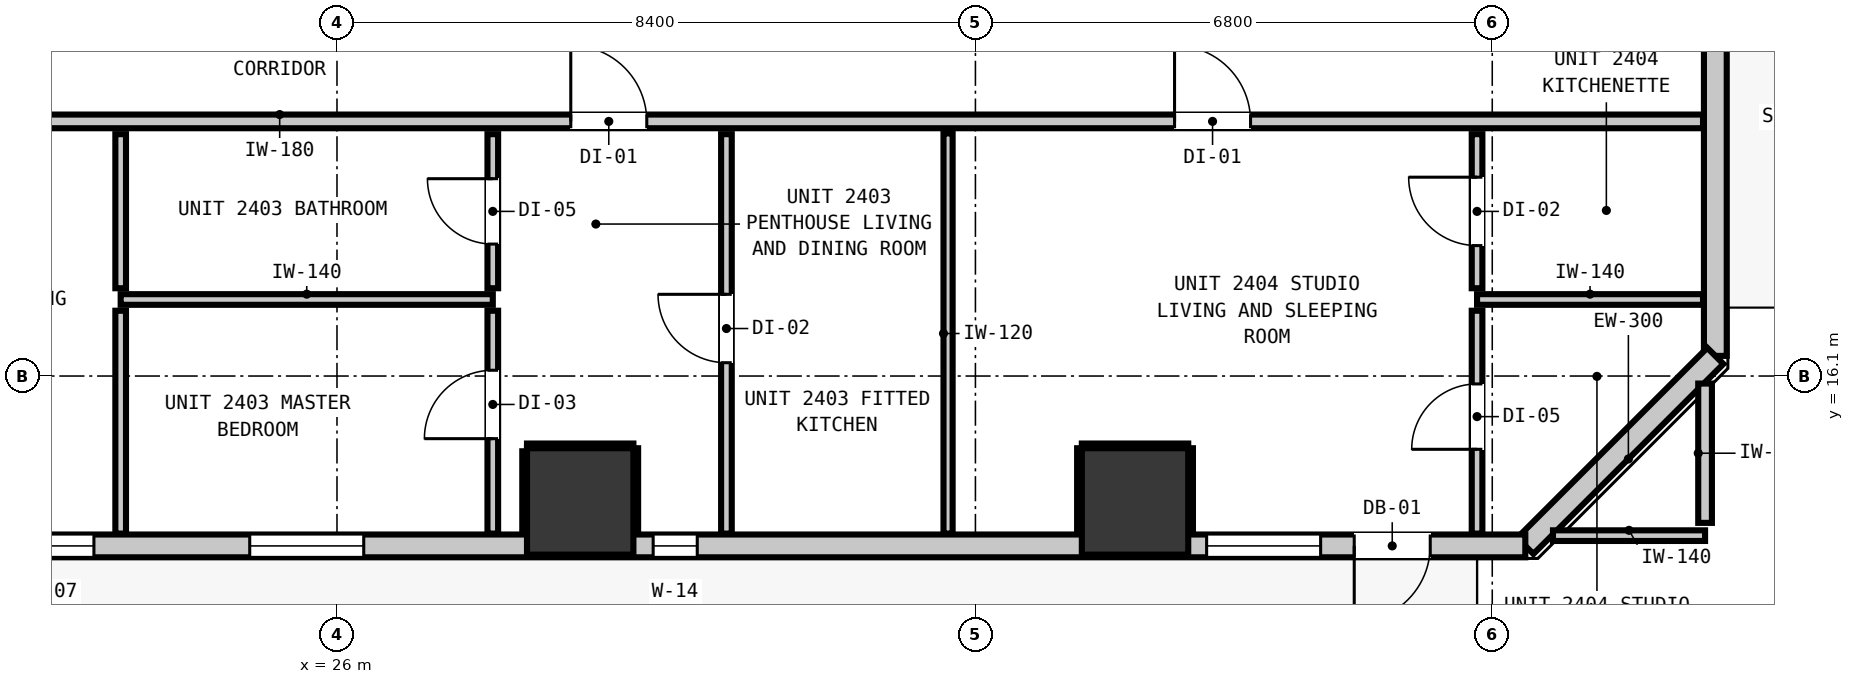
"""IFC4 building model, lengths in metres.
Left out: names, types, materials, properties, quantities, classifications, styles, units other than length and angle.
Written with IfcOpenShell. Run it as: python <this file> out.ifc"""

import sys

from ifc_helpers import new_model, si_unit, direction, frame, frame_2d, origin, origin_2d, place, context, subcontext, project, spatial, rectangle, extrude, element, fill, save


model = new_model("IFC4")
c1 = context("Model", 3, precision=1e-05, world=origin(), true_north=direction((0.0, 1.0)))
c2 = subcontext(c1, "Body", "Model", "MODEL_VIEW")
j1 = project(units=[si_unit("LENGTHUNIT", "METRE"), si_unit("PLANEANGLEUNIT", "RADIAN")], contexts=[c1])
p1 = place(None, origin())
s1 = spatial("IfcSite", under=j1, at=p1, CompositionType="ELEMENT")
p2 = place(p1, origin())
s2 = spatial("IfcBuilding", under=s1, at=p2, CompositionType="ELEMENT")
p3 = place(p2, frame((0.0, 0.0, 85.08)))
s3 = spatial("IfcBuildingStorey", under=s2, at=p3, CompositionType="ELEMENT", Elevation=85.08)
for number, where, z_axis, x_axis in (
    (1, (29.2, 14.45, 0.0), (0.0, 0.0, 1.0), (1.0, 0.0, 0.0)),
    (2, (36.5, 14.45, 0.0), (0.0, 0.0, 1.0), (1.0, 0.0, 0.0)),
):
    element("IfcColumn", number, at=place(p3, frame(where, z_axis=z_axis, x_axis=x_axis)), inside=s3, PredefinedType="COLUMN", context=c2, shape_type="SweptSolid", body=[
        extrude(rectangle(XDim=1.4, YDim=1.4, at=origin_2d()), origin(), (0.0, 0.0, 1.0), 3.32),
    ])
p4 = place(p3, frame((44.135, 51.035, 0.0), z_axis=(0.0, 0.0, 1.0), x_axis=(0.0, -1.0, 0.0)))
e3 = element("IfcWall", 3, at=p4, inside=s3, PredefinedType="STANDARD", context=c2, shape_type="SweptSolid", body=[
    extrude(rectangle(XDim=34.67, YDim=0.3, at=frame_2d((17.335, 0.0))), origin(), (0.0, 0.0, 1.0), 2.96),
])
p5 = place(p4, frame((0.901, 0.0, 0.0)))
e4 = element("IfcOpeningElement", 4, at=p5, cuts=e3, PredefinedType="OPENING", context=c2, shape_type="SweptSolid", body=[
    extrude(rectangle(XDim=1.0, YDim=2.15, at=frame_2d((0.5, 1.075))), frame((0.0, 0.16, 0.0), z_axis=(0.0, -1.0, 0.0), x_axis=(1.0, 0.0, 0.0)), (0.0, 0.0, 1.0), 0.32),
])
p6 = place(p4, frame((26.185, 0.0, 0.85)))
e5 = element("IfcOpeningElement", 5, at=p6, cuts=e3, PredefinedType="OPENING", context=c2, shape_type="SweptSolid", body=[
    extrude(rectangle(XDim=1.5, YDim=1.8, at=frame_2d((0.75, 0.9))), frame((0.0, 0.16, 0.0), z_axis=(0.0, -1.0, 0.0), x_axis=(1.0, 0.0, 0.0)), (0.0, 0.0, 1.0), 0.32),
])
p7 = place(p4, frame((13.401, 0.0, 0.85)))
e6 = element("IfcOpeningElement", 6, at=p7, cuts=e3, PredefinedType="OPENING", context=c2, shape_type="SweptSolid", body=[
    extrude(rectangle(XDim=1.5, YDim=1.8, at=frame_2d((0.75, 0.9))), frame((0.0, 0.16, 0.0), z_axis=(0.0, -1.0, 0.0), x_axis=(1.0, 0.0, 0.0)), (0.0, 0.0, 1.0), 0.32),
])
p8 = place(p3, frame((44.135, 16.365, 0.0), z_axis=(0.0, 0.0, 1.0), x_axis=(-0.707106781187, -0.707106781187, 0.0)))
e7 = element("IfcWall", 7, at=p8, inside=s3, PredefinedType="STANDARD", context=c2, shape_type="SweptSolid", body=[
    extrude(rectangle(XDim=3.536, YDim=0.3, at=frame_2d((1.768, 0.0))), origin(), (0.0, 0.0, 1.0), 2.96),
])
p9 = place(p3, frame((41.635, 13.865, 0.0), z_axis=(0.0, 0.0, 1.0), x_axis=(-1.0, 0.0, 0.0)))
e8 = element("IfcWall", 8, at=p9, inside=s3, PredefinedType="STANDARD", context=c2, shape_type="SweptSolid", body=[
    extrude(rectangle(XDim=37.47, YDim=0.3, at=frame_2d((18.735, 0.0))), origin(), (0.0, 0.0, 1.0), 2.96),
])
p10 = place(p9, frame((1.251, 0.0, 0.0)))
e9 = element("IfcOpeningElement", 9, at=p10, cuts=e8, PredefinedType="OPENING", context=c2, shape_type="SweptSolid", body=[
    extrude(rectangle(XDim=1.0, YDim=2.15, at=frame_2d((0.5, 1.075))), frame((0.0, 0.16, 0.0), z_axis=(0.0, -1.0, 0.0), x_axis=(1.0, 0.0, 0.0)), (0.0, 0.0, 1.0), 0.32),
])
p11 = place(p9, frame((32.085, 0.0, 0.85)))
e10 = element("IfcOpeningElement", 10, at=p11, cuts=e8, PredefinedType="OPENING", context=c2, shape_type="SweptSolid", body=[
    extrude(rectangle(XDim=1.5, YDim=1.8, at=frame_2d((0.75, 0.9))), frame((0.0, 0.16, 0.0), z_axis=(0.0, -1.0, 0.0), x_axis=(1.0, 0.0, 0.0)), (0.0, 0.0, 1.0), 0.32),
])
p12 = place(p9, frame((18.833, 0.0, 0.85)))
e11 = element("IfcOpeningElement", 11, at=p12, cuts=e8, PredefinedType="OPENING", context=c2, shape_type="SweptSolid", body=[
    extrude(rectangle(XDim=1.05, YDim=1.65, at=frame_2d((0.525, 0.825))), frame((0.0, 0.16, 0.0), z_axis=(0.0, -1.0, 0.0), x_axis=(1.0, 0.0, 0.0)), (0.0, 0.0, 1.0), 0.32),
])
p13 = place(p9, frame((10.895, 0.0, 0.85)))
e12 = element("IfcOpeningElement", 12, at=p13, cuts=e8, PredefinedType="OPENING", context=c2, shape_type="SweptSolid", body=[
    extrude(rectangle(XDim=0.58, YDim=1.5, at=frame_2d((0.29, 0.75))), frame((0.0, 0.16, 0.0), z_axis=(0.0, -1.0, 0.0), x_axis=(1.0, 0.0, 0.0)), (0.0, 0.0, 1.0), 0.32),
])
p14 = place(p9, frame((15.283, 0.0, 0.85)))
e13 = element("IfcOpeningElement", 13, at=p14, cuts=e8, PredefinedType="OPENING", context=c2, shape_type="SweptSolid", body=[
    extrude(rectangle(XDim=1.5, YDim=1.8, at=frame_2d((0.75, 0.9))), frame((0.0, 0.16, 0.0), z_axis=(0.0, -1.0, 0.0), x_axis=(1.0, 0.0, 0.0)), (0.0, 0.0, 1.0), 0.32),
])
p15 = place(p9, frame((2.693, 0.0, 0.85)))
e14 = element("IfcOpeningElement", 14, at=p15, cuts=e8, PredefinedType="OPENING", context=c2, shape_type="SweptSolid", body=[
    extrude(rectangle(XDim=1.5, YDim=1.8, at=frame_2d((0.75, 0.9))), frame((0.0, 0.16, 0.0), z_axis=(0.0, -1.0, 0.0), x_axis=(1.0, 0.0, 0.0)), (0.0, 0.0, 1.0), 0.32),
])
p16 = place(p3, frame((12.993, 19.45, 0.0), z_axis=(0.0, 0.0, 1.0), x_axis=(1.0, 0.0, 0.0)))
e15 = element("IfcWall", 15, at=p16, inside=s3, PredefinedType="PARTITIONING", context=c2, shape_type="SweptSolid", body=[
    extrude(rectangle(XDim=30.98, YDim=0.18, at=frame_2d((15.49, 0.0))), origin(), (0.0, 0.0, 1.0), 2.96),
])
p17 = place(p16, frame((0.11, 0.0, 0.0)))
e16 = element("IfcOpeningElement", 16, at=p17, cuts=e15, PredefinedType="OPENING", context=c2, shape_type="SweptSolid", body=[
    extrude(rectangle(XDim=1.0, YDim=2.15, at=frame_2d((0.5, 1.075))), frame((0.0, 0.1, 0.0), z_axis=(0.0, -1.0, 0.0), x_axis=(1.0, 0.0, 0.0)), (0.0, 0.0, 1.0), 0.2),
])
p18 = place(p16, frame((7.423, 0.0, 0.0)))
e17 = element("IfcOpeningElement", 17, at=p18, cuts=e15, PredefinedType="OPENING", context=c2, shape_type="SweptSolid", body=[
    extrude(rectangle(XDim=1.0, YDim=2.15, at=frame_2d((0.5, 1.075))), frame((0.0, 0.1, 0.0), z_axis=(0.0, -1.0, 0.0), x_axis=(1.0, 0.0, 0.0)), (0.0, 0.0, 1.0), 0.2),
])
p19 = place(p16, frame((16.083, 0.0, 0.0)))
e18 = element("IfcOpeningElement", 18, at=p19, cuts=e15, PredefinedType="OPENING", context=c2, shape_type="SweptSolid", body=[
    extrude(rectangle(XDim=1.0, YDim=2.15, at=frame_2d((0.5, 1.075))), frame((0.0, 0.1, 0.0), z_axis=(0.0, -1.0, 0.0), x_axis=(1.0, 0.0, 0.0)), (0.0, 0.0, 1.0), 0.2),
])
p20 = place(p16, frame((24.027, 0.0, 0.0)))
e19 = element("IfcOpeningElement", 19, at=p20, cuts=e15, PredefinedType="OPENING", context=c2, shape_type="SweptSolid", body=[
    extrude(rectangle(XDim=1.0, YDim=2.15, at=frame_2d((0.5, 1.075))), frame((0.0, 0.1, 0.0), z_axis=(0.0, -1.0, 0.0), x_axis=(1.0, 0.0, 0.0)), (0.0, 0.0, 1.0), 0.2),
])
p21 = place(p3, frame((41.999, 14.0, 0.0), z_axis=(0.0, 0.0, 1.0), x_axis=(1.0, 0.0, 0.0)))
e20 = element("IfcWall", 20, at=p21, inside=s3, PredefinedType="PARTITIONING", context=c2, shape_type="SweptSolid", body=[
    extrude(rectangle(XDim=2.001, YDim=0.14, at=frame_2d((1.0, 0.0))), origin(), (0.0, 0.0, 1.0), 2.96),
])
p22 = place(p3, frame((23.154, 17.107, 0.0), z_axis=(0.0, 0.0, 1.0), x_axis=(1.0, 0.0, 0.0)))
e21 = element("IfcWall", 21, at=p22, inside=s3, PredefinedType="PARTITIONING", context=c2, shape_type="SweptSolid", body=[
    extrude(rectangle(XDim=4.896, YDim=0.14, at=frame_2d((2.448, 0.0))), origin(), (0.0, 0.0, 1.0), 2.96),
])
p23 = place(p3, frame((41.0, 17.107, 0.0), z_axis=(0.0, 0.0, 1.0), x_axis=(1.0, 0.0, 0.0)))
e22 = element("IfcWall", 22, at=p23, inside=s3, PredefinedType="PARTITIONING", context=c2, shape_type="SweptSolid", body=[
    extrude(rectangle(XDim=2.973, YDim=0.14, at=frame_2d((1.486, 0.0))), origin(), (0.0, 0.0, 1.0), 2.96),
])
p24 = place(p3, frame((44.0, 14.168, 0.0), z_axis=(0.0, 0.0, 1.0), x_axis=(0.0, 1.0, 0.0)))
e23 = element("IfcWall", 23, at=p24, inside=s3, PredefinedType="PARTITIONING", context=c2, shape_type="SweptSolid", body=[
    extrude(rectangle(XDim=1.833, YDim=0.18, at=frame_2d((0.917, 0.0))), origin(), (0.0, 0.0, 1.0), 2.96),
])
p25 = place(p3, frame((23.154, 14.027, 0.0), z_axis=(0.0, 0.0, 1.0), x_axis=(0.0, 1.0, 0.0)))
e24 = element("IfcWall", 24, at=p25, inside=s3, PredefinedType="PARTITIONING", context=c2, shape_type="SweptSolid", body=[
    extrude(rectangle(XDim=2.932, YDim=0.14, at=frame_2d((1.466, 0.0))), origin(), (0.0, 0.0, 1.0), 2.96),
])
p26 = place(p3, frame((23.154, 17.255, 0.0), z_axis=(0.0, 0.0, 1.0), x_axis=(0.0, 1.0, 0.0)))
e25 = element("IfcWall", 25, at=p26, inside=s3, PredefinedType="PARTITIONING", context=c2, shape_type="SweptSolid", body=[
    extrude(rectangle(XDim=2.027, YDim=0.14, at=frame_2d((1.014, 0.0))), origin(), (0.0, 0.0, 1.0), 2.96),
])
p27 = place(p3, frame((28.05, 14.027, 0.0), z_axis=(0.0, 0.0, 1.0), x_axis=(0.0, 1.0, 0.0)))
e26 = element("IfcWall", 26, at=p27, inside=s3, PredefinedType="PARTITIONING", context=c2, shape_type="SweptSolid", body=[
    extrude(rectangle(XDim=2.932, YDim=0.14, at=frame_2d((1.466, 0.0))), origin(), (0.0, 0.0, 1.0), 2.96),
])
p28 = place(p27, frame((1.249, 0.0, 0.0)))
e27 = element("IfcOpeningElement", 27, at=p28, cuts=e26, PredefinedType="OPENING", context=c2, shape_type="SweptSolid", body=[
    extrude(rectangle(XDim=0.9, YDim=2.1, at=frame_2d((0.45, 1.05))), frame((0.0, 0.08, 0.0), z_axis=(0.0, -1.0, 0.0), x_axis=(1.0, 0.0, 0.0)), (0.0, 0.0, 1.0), 0.16),
])
p29 = place(p3, frame((28.05, 17.255, 0.0), z_axis=(0.0, 0.0, 1.0), x_axis=(0.0, 1.0, 0.0)))
e28 = element("IfcWall", 28, at=p29, inside=s3, PredefinedType="PARTITIONING", context=c2, shape_type="SweptSolid", body=[
    extrude(rectangle(XDim=2.027, YDim=0.14, at=frame_2d((1.014, 0.0))), origin(), (0.0, 0.0, 1.0), 2.96),
])
p30 = place(p29, frame((0.581, 0.0, 0.0)))
e29 = element("IfcOpeningElement", 29, at=p30, cuts=e28, PredefinedType="OPENING", context=c2, shape_type="SweptSolid", body=[
    extrude(rectangle(XDim=0.86, YDim=2.02, at=frame_2d((0.43, 1.01))), frame((0.0, 0.08, 0.0), z_axis=(0.0, -1.0, 0.0), x_axis=(1.0, 0.0, 0.0)), (0.0, 0.0, 1.0), 0.16),
])
p31 = place(p3, frame((31.124, 14.027, 0.0), z_axis=(0.0, 0.0, 1.0), x_axis=(0.0, 1.0, 0.0)))
e30 = element("IfcWall", 30, at=p31, inside=s3, PredefinedType="PARTITIONING", context=c2, shape_type="SweptSolid", body=[
    extrude(rectangle(XDim=5.255, YDim=0.14, at=frame_2d((2.627, 0.0))), origin(), (0.0, 0.0, 1.0), 2.96),
])
p32 = place(p31, frame((2.248, 0.0, 0.0)))
e31 = element("IfcOpeningElement", 31, at=p32, cuts=e30, PredefinedType="OPENING", context=c2, shape_type="SweptSolid", body=[
    extrude(rectangle(XDim=0.9, YDim=2.1, at=frame_2d((0.45, 1.05))), frame((0.0, 0.08, 0.0), z_axis=(0.0, -1.0, 0.0), x_axis=(1.0, 0.0, 0.0)), (0.0, 0.0, 1.0), 0.16),
])
p33 = place(p3, frame((41.0, 14.027, 0.0), z_axis=(0.0, 0.0, 1.0), x_axis=(0.0, 1.0, 0.0)))
e32 = element("IfcWall", 32, at=p33, inside=s3, PredefinedType="PARTITIONING", context=c2, shape_type="SweptSolid", body=[
    extrude(rectangle(XDim=2.932, YDim=0.14, at=frame_2d((1.466, 0.0))), origin(), (0.0, 0.0, 1.0), 2.96),
])
p34 = place(p33, frame((1.109, 0.0, 0.0)))
e33 = element("IfcOpeningElement", 33, at=p34, cuts=e32, PredefinedType="OPENING", context=c2, shape_type="SweptSolid", body=[
    extrude(rectangle(XDim=0.86, YDim=2.02, at=frame_2d((0.43, 1.01))), frame((0.0, 0.08, 0.0), z_axis=(0.0, -1.0, 0.0), x_axis=(1.0, 0.0, 0.0)), (0.0, 0.0, 1.0), 0.16),
])
p35 = place(p3, frame((41.0, 17.255, 0.0), z_axis=(0.0, 0.0, 1.0), x_axis=(0.0, 1.0, 0.0)))
e34 = element("IfcWall", 34, at=p35, inside=s3, PredefinedType="PARTITIONING", context=c2, shape_type="SweptSolid", body=[
    extrude(rectangle(XDim=2.027, YDim=0.14, at=frame_2d((1.014, 0.0))), origin(), (0.0, 0.0, 1.0), 2.96),
])
p36 = place(p35, frame((0.561, 0.0, 0.0)))
e35 = element("IfcOpeningElement", 35, at=p36, cuts=e34, PredefinedType="OPENING", context=c2, shape_type="SweptSolid", body=[
    extrude(rectangle(XDim=0.9, YDim=2.1, at=frame_2d((0.45, 1.05))), frame((0.0, 0.08, 0.0), z_axis=(0.0, -1.0, 0.0), x_axis=(1.0, 0.0, 0.0)), (0.0, 0.0, 1.0), 0.16),
])
p37 = place(p3, frame((34.04, 14.027, 0.0), z_axis=(0.0, 0.0, 1.0), x_axis=(0.0, 1.0, 0.0)))
e36 = element("IfcWall", 36, at=p37, inside=s3, PredefinedType="PARTITIONING", context=c2, shape_type="SweptSolid", body=[
    extrude(rectangle(XDim=5.265, YDim=0.12, at=frame_2d((2.632, 0.0))), origin(), (0.0, 0.0, 1.0), 2.96),
])
p38 = place(p3, frame((28.5, 15.182, 0.0), z_axis=(0.0, 0.0, 1.0), x_axis=(1.0, 0.0, 0.0)))
e37 = element("IfcWall", 37, at=p38, inside=s3, PredefinedType="PARTITIONING", context=c2, shape_type="SweptSolid", body=[
    extrude(rectangle(XDim=1.4, YDim=0.06, at=frame_2d((0.7, 0.0))), origin(), (0.0, 0.0, 1.0), 1.45),
])
p39 = place(p3, frame((28.468, 14.03, 0.0), z_axis=(0.0, 0.0, 1.0), x_axis=(0.0, 1.0, 0.0)))
e38 = element("IfcWall", 38, at=p39, inside=s3, PredefinedType="PARTITIONING", context=c2, shape_type="SweptSolid", body=[
    extrude(rectangle(XDim=1.08, YDim=0.06, at=frame_2d((0.54, 0.0))), origin(), (0.0, 0.0, 1.0), 1.45),
])
p40 = place(p3, frame((29.932, 14.03, 0.0), z_axis=(0.0, 0.0, 1.0), x_axis=(0.0, 1.0, 0.0)))
e39 = element("IfcWall", 39, at=p40, inside=s3, PredefinedType="PARTITIONING", context=c2, shape_type="SweptSolid", body=[
    extrude(rectangle(XDim=1.12, YDim=0.06, at=frame_2d((0.56, 0.0))), origin(), (0.0, 0.0, 1.0), 1.45),
])
p41 = place(p3, frame((35.8, 15.182, 0.0), z_axis=(0.0, 0.0, 1.0), x_axis=(1.0, 0.0, 0.0)))
e40 = element("IfcWall", 40, at=p41, inside=s3, PredefinedType="PARTITIONING", context=c2, shape_type="SweptSolid", body=[
    extrude(rectangle(XDim=1.4, YDim=0.06, at=frame_2d((0.7, 0.0))), origin(), (0.0, 0.0, 1.0), 1.45),
])
for number, where, z_axis, x_axis in (
    (41, (35.768, 14.03, 0.0), (0.0, 0.0, 1.0), (0.0, 1.0, 0.0)),
    (42, (37.232, 14.03, 0.0), (0.0, 0.0, 1.0), (0.0, 1.0, 0.0)),
):
    element("IfcWall", number, at=place(p3, frame(where, z_axis=z_axis, x_axis=x_axis)), inside=s3, PredefinedType="PARTITIONING", context=c2, shape_type="SweptSolid", body=[
        extrude(rectangle(XDim=1.12, YDim=0.06, at=frame_2d((0.56, 0.0))), origin(), (0.0, 0.0, 1.0), 1.45),
    ])
p42 = place(p10, origin())
e43 = element("IfcDoor", 43, at=p42, inside=s3, OperationType="SINGLE_SWING_RIGHT", PredefinedType="DOOR", context=c2, shape_type="SweptSolid", body=[
    extrude(rectangle(XDim=1.0, YDim=2.15, at=frame_2d((0.5, 1.075))), frame((0.0, 0.025, 0.0), z_axis=(0.0, -1.0, 0.0), x_axis=(1.0, 0.0, 0.0)), (0.0, 0.0, 1.0), 0.05),
])
fill(e9, e43)
p43 = place(p12, origin())
e44 = element("IfcWindow", 44, at=p43, inside=s3, PartitioningType="SINGLE_PANEL", PredefinedType="WINDOW", context=c2, shape_type="SweptSolid", body=[
    extrude(rectangle(XDim=1.05, YDim=1.65, at=frame_2d((0.525, 0.825))), frame((0.0, 0.03, 0.0), z_axis=(0.0, -1.0, 0.0), x_axis=(1.0, 0.0, 0.0)), (0.0, 0.0, 1.0), 0.06),
])
fill(e11, e44)
p44 = place(p13, origin())
e45 = element("IfcWindow", 45, at=p44, inside=s3, PartitioningType="SINGLE_PANEL", PredefinedType="WINDOW", context=c2, shape_type="SweptSolid", body=[
    extrude(rectangle(XDim=0.58, YDim=1.5, at=frame_2d((0.29, 0.75))), frame((0.0, 0.03, 0.0), z_axis=(0.0, -1.0, 0.0), x_axis=(1.0, 0.0, 0.0)), (0.0, 0.0, 1.0), 0.06),
])
fill(e12, e45)
p45 = place(p14, origin())
e46 = element("IfcWindow", 46, at=p45, inside=s3, PartitioningType="SINGLE_PANEL", PredefinedType="WINDOW", context=c2, shape_type="SweptSolid", body=[
    extrude(rectangle(XDim=1.5, YDim=1.8, at=frame_2d((0.75, 0.9))), frame((0.0, 0.03, 0.0), z_axis=(0.0, -1.0, 0.0), x_axis=(1.0, 0.0, 0.0)), (0.0, 0.0, 1.0), 0.06),
])
fill(e13, e46)
p46 = place(p15, origin())
e47 = element("IfcWindow", 47, at=p46, inside=s3, PartitioningType="SINGLE_PANEL", PredefinedType="WINDOW", context=c2, shape_type="SweptSolid", body=[
    extrude(rectangle(XDim=1.5, YDim=1.8, at=frame_2d((0.75, 0.9))), frame((0.0, 0.03, 0.0), z_axis=(0.0, -1.0, 0.0), x_axis=(1.0, 0.0, 0.0)), (0.0, 0.0, 1.0), 0.06),
])
fill(e14, e47)
p47 = place(p19, origin())
e48 = element("IfcDoor", 48, at=p47, inside=s3, OperationType="SINGLE_SWING_LEFT", PredefinedType="DOOR", context=c2, shape_type="SweptSolid", body=[
    extrude(rectangle(XDim=1.0, YDim=2.15, at=frame_2d((0.5, 1.075))), frame((0.0, 0.025, 0.0), z_axis=(0.0, -1.0, 0.0), x_axis=(1.0, 0.0, 0.0)), (0.0, 0.0, 1.0), 0.05),
])
fill(e18, e48)
p48 = place(p30, origin())
e49 = element("IfcDoor", 49, at=p48, inside=s3, OperationType="SINGLE_SWING_RIGHT", PredefinedType="DOOR", context=c2, shape_type="SweptSolid", body=[
    extrude(rectangle(XDim=0.86, YDim=2.02, at=frame_2d((0.43, 1.01))), frame((0.0, 0.025, 0.0), z_axis=(0.0, -1.0, 0.0), x_axis=(1.0, 0.0, 0.0)), (0.0, 0.0, 1.0), 0.05),
])
fill(e29, e49)
p49 = place(p28, origin())
e50 = element("IfcDoor", 50, at=p49, inside=s3, OperationType="SINGLE_SWING_LEFT", PredefinedType="DOOR", context=c2, shape_type="SweptSolid", body=[
    extrude(rectangle(XDim=0.9, YDim=2.1, at=frame_2d((0.45, 1.05))), frame((0.0, 0.025, 0.0), z_axis=(0.0, -1.0, 0.0), x_axis=(1.0, 0.0, 0.0)), (0.0, 0.0, 1.0), 0.05),
])
fill(e27, e50)
p50 = place(p32, origin())
e51 = element("IfcDoor", 51, at=p50, inside=s3, OperationType="SINGLE_SWING_RIGHT", PredefinedType="DOOR", context=c2, shape_type="SweptSolid", body=[
    extrude(rectangle(XDim=0.9, YDim=2.1, at=frame_2d((0.45, 1.05))), frame((0.0, 0.025, 0.0), z_axis=(0.0, -1.0, 0.0), x_axis=(1.0, 0.0, 0.0)), (0.0, 0.0, 1.0), 0.05),
])
fill(e31, e51)
p51 = place(p20, origin())
e52 = element("IfcDoor", 52, at=p51, inside=s3, OperationType="SINGLE_SWING_LEFT", PredefinedType="DOOR", context=c2, shape_type="SweptSolid", body=[
    extrude(rectangle(XDim=1.0, YDim=2.15, at=frame_2d((0.5, 1.075))), frame((0.0, 0.025, 0.0), z_axis=(0.0, -1.0, 0.0), x_axis=(1.0, 0.0, 0.0)), (0.0, 0.0, 1.0), 0.05),
])
fill(e19, e52)
p52 = place(p36, origin())
e53 = element("IfcDoor", 53, at=p52, inside=s3, OperationType="SINGLE_SWING_RIGHT", PredefinedType="DOOR", context=c2, shape_type="SweptSolid", body=[
    extrude(rectangle(XDim=0.9, YDim=2.1, at=frame_2d((0.45, 1.05))), frame((0.0, 0.025, 0.0), z_axis=(0.0, -1.0, 0.0), x_axis=(1.0, 0.0, 0.0)), (0.0, 0.0, 1.0), 0.05),
])
fill(e35, e53)
p53 = place(p34, origin())
e54 = element("IfcDoor", 54, at=p53, inside=s3, OperationType="SINGLE_SWING_LEFT", PredefinedType="DOOR", context=c2, shape_type="SweptSolid", body=[
    extrude(rectangle(XDim=0.86, YDim=2.02, at=frame_2d((0.43, 1.01))), frame((0.0, 0.025, 0.0), z_axis=(0.0, -1.0, 0.0), x_axis=(1.0, 0.0, 0.0)), (0.0, 0.0, 1.0), 0.05),
])
fill(e33, e54)
save(model, sys.argv[1])
